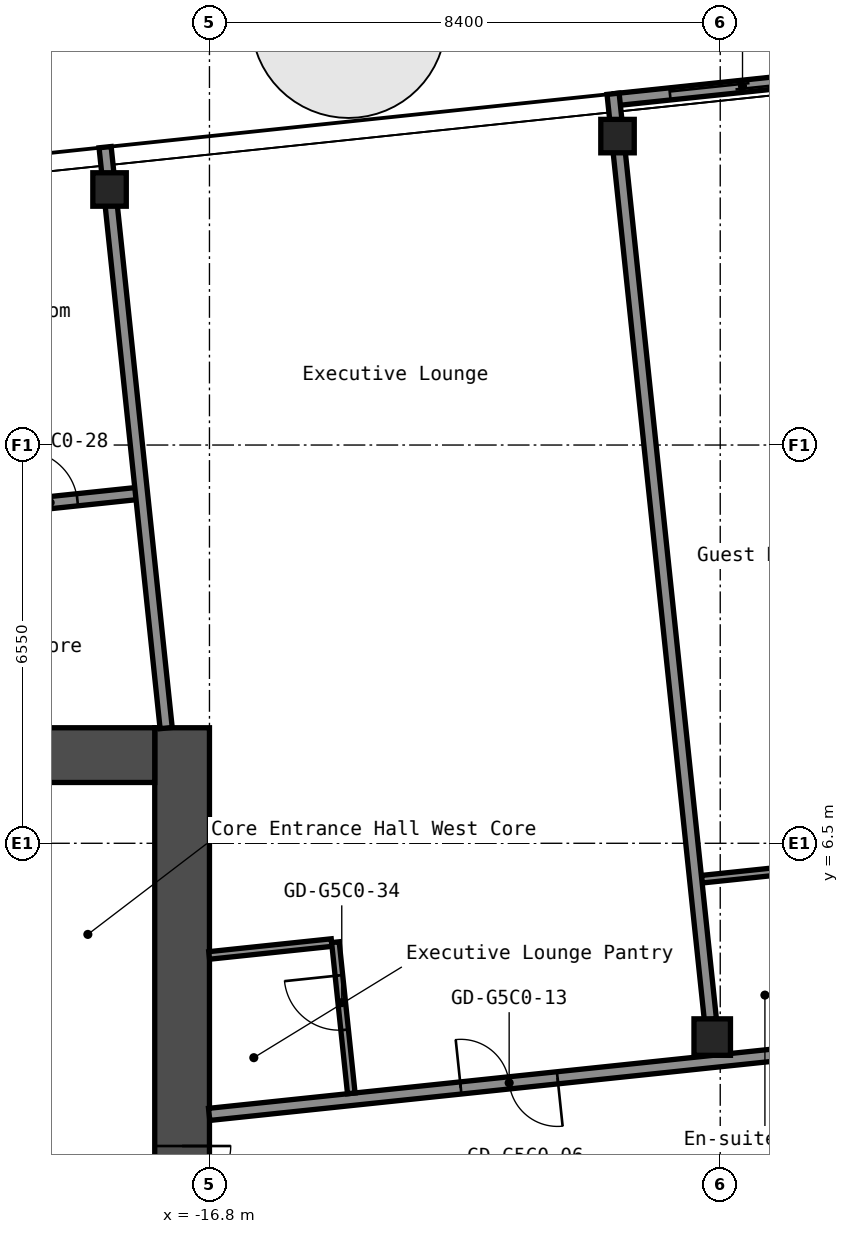
"""IFC4 building model, lengths in metres.
Left out: names, types, materials, properties, quantities, classifications, styles, units other than length and angle.
Written with IfcOpenShell. Run it as: python <this file> out.ifc"""

import sys

from ifc_helpers import new_model, si_unit, direction, frame, frame_2d, origin, origin_2d, place, context, subcontext, project, spatial, rectangle, hollow_rectangle, extrude, element, fill, save


model = new_model("IFC4")
c1 = context("Model", 3, precision=1e-05, world=origin(), true_north=direction((0.0, 1.0)))
c2 = subcontext(c1, "Body", "Model", "MODEL_VIEW")
j1 = project(units=[si_unit("LENGTHUNIT", "METRE"), si_unit("PLANEANGLEUNIT", "RADIAN")], contexts=[c1])
p1 = place(None, origin())
s1 = spatial("IfcSite", under=j1, at=p1, CompositionType="ELEMENT")
p2 = place(p1, origin())
s2 = spatial("IfcBuilding", under=s1, at=p2, CompositionType="ELEMENT")
p3 = place(p2, frame((0.0, 0.0, 245.4)))
s3 = spatial("IfcBuildingStorey", under=s2, at=p3, CompositionType="ELEMENT", Elevation=245.4)
p4 = place(p3, frame((-18.443, 17.253, 0.0), z_axis=(0.0, 0.0, 1.0), x_axis=(1.0, 0.0, 0.0)))
e1 = element("IfcColumn", 1, at=p4, inside=s3, PredefinedType="COLUMN", context=c2, shape_type="SweptSolid", body=[
    extrude(hollow_rectangle(XDim=0.55, YDim=0.55, WallThickness=0.022, InnerFilletRadius=0.033, OuterFilletRadius=0.055, at=origin_2d()), origin(), (0.0, 0.0, 1.0), 2.75),
])
p5 = place(p3, frame((-8.532, 3.312, 0.0), z_axis=(0.0, 0.0, 1.0), x_axis=(1.0, 0.0, 0.0)))
e2 = element("IfcColumn", 2, at=p5, inside=s3, PredefinedType="COLUMN", context=c2, shape_type="SweptSolid", body=[
    extrude(hollow_rectangle(XDim=0.6, YDim=0.6, WallThickness=0.025, InnerFilletRadius=0.038, OuterFilletRadius=0.062, at=origin_2d()), origin(), (0.0, 0.0, 1.0), 2.75),
])
p6 = place(p3, frame((-10.089, 18.131, 0.0), z_axis=(0.0, 0.0, 1.0), x_axis=(1.0, 0.0, 0.0)))
e3 = element("IfcColumn", 3, at=p6, inside=s3, PredefinedType="COLUMN", context=c2, shape_type="SweptSolid", body=[
    extrude(hollow_rectangle(XDim=0.55, YDim=0.55, WallThickness=0.022, InnerFilletRadius=0.033, OuterFilletRadius=0.055, at=origin_2d()), origin(), (0.0, 0.0, 1.0), 2.75),
])
p7 = place(p3, frame((-17.25, -8.4, 0.0), z_axis=(0.0, 0.0, 1.0), x_axis=(0.0, 1.0, 0.0)))
e4 = element("IfcWall", 4, at=p7, inside=s3, PredefinedType="SHEAR", context=c2, shape_type="SweptSolid", body=[
    extrude(rectangle(XDim=16.8, YDim=0.9, at=frame_2d((8.4, 0.0))), origin(), (0.0, 0.0, 1.0), 2.75),
])
p8 = place(p7, frame((8.321, 0.0, 0.0)))
e5 = element("IfcOpeningElement", 5, at=p8, cuts=e4, PredefinedType="OPENING", context=c2, shape_type="SweptSolid", body=[
    extrude(rectangle(XDim=1.6, YDim=2.1, at=frame_2d((0.8, 1.05))), frame((0.0, 0.46, 0.0), z_axis=(0.0, -1.0, 0.0), x_axis=(1.0, 0.0, 0.0)), (0.0, 0.0, 1.0), 0.92),
])
p9 = place(p3, frame((-32.7, 7.95, 0.0), z_axis=(0.0, 0.0, 1.0), x_axis=(1.0, 0.0, 0.0)))
e6 = element("IfcWall", 6, at=p9, inside=s3, PredefinedType="SHEAR", context=c2, shape_type="SweptSolid", body=[
    extrude(rectangle(XDim=15.0, YDim=0.9, at=frame_2d((7.5, 0.0))), origin(), (0.0, 0.0, 1.0), 2.75),
])
p10 = place(p9, frame((3.4, 0.0, 0.0)))
e7 = element("IfcOpeningElement", 7, at=p10, cuts=e6, PredefinedType="OPENING", context=c2, shape_type="SweptSolid", body=[
    extrude(rectangle(XDim=1.2, YDim=2.1, at=frame_2d((0.6, 1.05))), frame((0.0, 0.46, 0.0), z_axis=(0.0, -1.0, 0.0), x_axis=(1.0, 0.0, 0.0)), (0.0, 0.0, 1.0), 0.92),
])
p11 = place(p9, frame((0.75, 0.0, 0.0)))
e8 = element("IfcOpeningElement", 8, at=p11, cuts=e6, PredefinedType="OPENING", context=c2, shape_type="SweptSolid", body=[
    extrude(rectangle(XDim=0.9, YDim=2.1, at=frame_2d((0.45, 1.05))), frame((0.0, 0.46, 0.0), z_axis=(0.0, -1.0, 0.0), x_axis=(1.0, 0.0, 0.0)), (0.0, 0.0, 1.0), 0.92),
])
p12 = place(p3, frame((-16.572, -0.549, 0.0), z_axis=(0.0, 0.0, 1.0), x_axis=(0.994521146831, 0.104535584879, 0.0)))
e9 = element("IfcWall", 9, at=p12, inside=s3, PredefinedType="PARTITIONING", context=c2, shape_type="SweptSolid", body=[
    extrude(rectangle(XDim=33.561, YDim=0.2, at=frame_2d((16.78, 0.0))), origin(), (0.0, 0.0, 1.0), 2.75),
])
p13 = place(p12, frame((4.2, 0.0, 0.0)))
e10 = element("IfcOpeningElement", 10, at=p13, cuts=e9, PredefinedType="OPENING", context=c2, shape_type="SweptSolid", body=[
    extrude(rectangle(XDim=1.6, YDim=2.1, at=frame_2d((0.8, 1.05))), frame((0.0, 0.11, 0.0), z_axis=(0.0, -1.0, 0.0), x_axis=(1.0, 0.0, 0.0)), (0.0, 0.0, 1.0), 0.22),
])
p14 = place(p12, frame((11.25, 0.0, 0.0)))
e11 = element("IfcOpeningElement", 11, at=p14, cuts=e9, PredefinedType="OPENING", context=c2, shape_type="SweptSolid", body=[
    extrude(rectangle(XDim=1.0, YDim=2.1, at=frame_2d((0.5, 1.05))), frame((0.0, 0.11, 0.0), z_axis=(0.0, -1.0, 0.0), x_axis=(1.0, 0.0, 0.0)), (0.0, 0.0, 1.0), 0.22),
])
p15 = place(p12, frame((12.95, 0.0, 0.0)))
e12 = element("IfcOpeningElement", 12, at=p15, cuts=e9, PredefinedType="OPENING", context=c2, shape_type="SweptSolid", body=[
    extrude(rectangle(XDim=1.0, YDim=2.1, at=frame_2d((0.5, 1.05))), frame((0.0, 0.11, 0.0), z_axis=(0.0, -1.0, 0.0), x_axis=(1.0, 0.0, 0.0)), (0.0, 0.0, 1.0), 0.22),
])
p16 = place(p12, frame((18.2, 0.0, 0.0)))
e13 = element("IfcOpeningElement", 13, at=p16, cuts=e9, PredefinedType="OPENING", context=c2, shape_type="SweptSolid", body=[
    extrude(rectangle(XDim=0.9, YDim=2.1, at=frame_2d((0.45, 1.05))), frame((0.0, 0.11, 0.0), z_axis=(0.0, -1.0, 0.0), x_axis=(1.0, 0.0, 0.0)), (0.0, 0.0, 1.0), 0.22),
])
p17 = place(p12, frame((22.4, 0.0, 0.0)))
e14 = element("IfcOpeningElement", 14, at=p17, cuts=e9, PredefinedType="OPENING", context=c2, shape_type="SweptSolid", body=[
    extrude(rectangle(XDim=0.9, YDim=2.1, at=frame_2d((0.45, 1.05))), frame((0.0, 0.11, 0.0), z_axis=(0.0, -1.0, 0.0), x_axis=(1.0, 0.0, 0.0)), (0.0, 0.0, 1.0), 0.22),
])
p18 = place(p12, frame((26.345, 0.0, 0.0)))
e15 = element("IfcOpeningElement", 15, at=p18, cuts=e9, PredefinedType="OPENING", context=c2, shape_type="SweptSolid", body=[
    extrude(rectangle(XDim=0.9, YDim=2.1, at=frame_2d((0.45, 1.05))), frame((0.0, 0.11, 0.0), z_axis=(0.0, -1.0, 0.0), x_axis=(1.0, 0.0, 0.0)), (0.0, 0.0, 1.0), 0.22),
])
p19 = place(p12, frame((30.545, 0.0, 0.0)))
e16 = element("IfcOpeningElement", 16, at=p19, cuts=e9, PredefinedType="OPENING", context=c2, shape_type="SweptSolid", body=[
    extrude(rectangle(XDim=0.9, YDim=2.1, at=frame_2d((0.45, 1.05))), frame((0.0, 0.11, 0.0), z_axis=(0.0, -1.0, 0.0), x_axis=(1.0, 0.0, 0.0)), (0.0, 0.0, 1.0), 0.22),
])
p20 = place(p3, frame((-16.805, 2.041, 0.0), z_axis=(0.0, 0.0, 1.0), x_axis=(0.994521146831, 0.104535584879, 0.0)))
e17 = element("IfcWall", 17, at=p20, inside=s3, PredefinedType="PARTITIONING", context=c2, shape_type="SweptSolid", body=[
    extrude(rectangle(XDim=33.561, YDim=0.2, at=frame_2d((16.78, 0.0))), origin(), (0.0, 0.0, 1.0), 2.75),
])
p21 = place(p20, frame((4.161, 0.0, 0.0)))
e18 = element("IfcOpeningElement", 18, at=p21, cuts=e17, PredefinedType="OPENING", context=c2, shape_type="SweptSolid", body=[
    extrude(rectangle(XDim=1.6, YDim=2.1, at=frame_2d((0.8, 1.05))), frame((0.0, 0.11, 0.0), z_axis=(0.0, -1.0, 0.0), x_axis=(1.0, 0.0, 0.0)), (0.0, 0.0, 1.0), 0.22),
])
p22 = place(p20, frame((11.211, 0.0, 0.0)))
e19 = element("IfcOpeningElement", 19, at=p22, cuts=e17, PredefinedType="OPENING", context=c2, shape_type="SweptSolid", body=[
    extrude(rectangle(XDim=1.0, YDim=2.1, at=frame_2d((0.5, 1.05))), frame((0.0, 0.11, 0.0), z_axis=(0.0, -1.0, 0.0), x_axis=(1.0, 0.0, 0.0)), (0.0, 0.0, 1.0), 0.22),
])
p23 = place(p20, frame((12.911, 0.0, 0.0)))
e20 = element("IfcOpeningElement", 20, at=p23, cuts=e17, PredefinedType="OPENING", context=c2, shape_type="SweptSolid", body=[
    extrude(rectangle(XDim=1.0, YDim=2.1, at=frame_2d((0.5, 1.05))), frame((0.0, 0.11, 0.0), z_axis=(0.0, -1.0, 0.0), x_axis=(1.0, 0.0, 0.0)), (0.0, 0.0, 1.0), 0.22),
])
p24 = place(p20, frame((18.241, 0.0, 0.0)))
e21 = element("IfcOpeningElement", 21, at=p24, cuts=e17, PredefinedType="OPENING", context=c2, shape_type="SweptSolid", body=[
    extrude(rectangle(XDim=0.9, YDim=2.1, at=frame_2d((0.45, 1.05))), frame((0.0, 0.11, 0.0), z_axis=(0.0, -1.0, 0.0), x_axis=(1.0, 0.0, 0.0)), (0.0, 0.0, 1.0), 0.22),
])
p25 = place(p20, frame((22.441, 0.0, 0.0)))
e22 = element("IfcOpeningElement", 22, at=p25, cuts=e17, PredefinedType="OPENING", context=c2, shape_type="SweptSolid", body=[
    extrude(rectangle(XDim=0.9, YDim=2.1, at=frame_2d((0.45, 1.05))), frame((0.0, 0.11, 0.0), z_axis=(0.0, -1.0, 0.0), x_axis=(1.0, 0.0, 0.0)), (0.0, 0.0, 1.0), 0.22),
])
p26 = place(p20, frame((29.361, 0.0, 0.0)))
e23 = element("IfcOpeningElement", 23, at=p26, cuts=e17, PredefinedType="OPENING", context=c2, shape_type="SweptSolid", body=[
    extrude(rectangle(XDim=1.6, YDim=2.1, at=frame_2d((0.8, 1.05))), frame((0.0, 0.11, 0.0), z_axis=(0.0, -1.0, 0.0), x_axis=(1.0, 0.0, 0.0)), (0.0, 0.0, 1.0), 0.22),
])
p27 = place(p3, frame((-16.805, 4.655, 0.0), z_axis=(0.0, 0.0, 1.0), x_axis=(0.994521955988, 0.104527886512, 0.0)))
e24 = element("IfcWall", 24, at=p27, inside=s3, PredefinedType="PARTITIONING", context=c2, shape_type="SweptSolid", body=[
    extrude(rectangle(XDim=2.025, YDim=0.125, at=frame_2d((1.012, 0.0))), origin(), (0.0, 0.0, 1.0), 2.75),
])
p28 = place(p3, frame((-8.704, 5.909, 0.0), z_axis=(0.0, 0.0, 1.0), x_axis=(0.994530605544, 0.104445558238, 0.0)))
e25 = element("IfcWall", 25, at=p28, inside=s3, PredefinedType="PARTITIONING", context=c2, shape_type="SweptSolid", body=[
    extrude(rectangle(XDim=2.337, YDim=0.125, at=frame_2d((1.169, 0.0))), origin(), (0.0, 0.0, 1.0), 2.75),
])
p29 = place(p3, frame((-39.102, 10.034, 0.0), z_axis=(0.0, 0.0, 1.0), x_axis=(0.994522585465, 0.104521897229, 0.0)))
e26 = element("IfcWall", 26, at=p29, inside=s3, PredefinedType="PARTITIONING", context=c2, shape_type="SweptSolid", body=[
    extrude(rectangle(XDim=21.3, YDim=0.2, at=frame_2d((10.65, 0.0))), origin(), (0.0, 0.0, 1.0), 2.75),
])
p30 = place(p29, frame((3.05, 0.0, 0.0)))
e27 = element("IfcOpeningElement", 27, at=p30, cuts=e26, PredefinedType="OPENING", context=c2, shape_type="SweptSolid", body=[
    extrude(rectangle(XDim=1.0, YDim=2.1, at=frame_2d((0.5, 1.05))), frame((0.0, 0.11, 0.0), z_axis=(0.0, -1.0, 0.0), x_axis=(1.0, 0.0, 0.0)), (0.0, 0.0, 1.0), 0.22),
])
p31 = place(p29, frame((7.2, 0.0, 0.0)))
e28 = element("IfcOpeningElement", 28, at=p31, cuts=e26, PredefinedType="OPENING", context=c2, shape_type="SweptSolid", body=[
    extrude(rectangle(XDim=1.0, YDim=2.1, at=frame_2d((0.5, 1.05))), frame((0.0, 0.11, 0.0), z_axis=(0.0, -1.0, 0.0), x_axis=(1.0, 0.0, 0.0)), (0.0, 0.0, 1.0), 0.22),
])
p32 = place(p29, frame((9.2, 0.0, 0.0)))
e29 = element("IfcOpeningElement", 29, at=p32, cuts=e26, PredefinedType="OPENING", context=c2, shape_type="SweptSolid", body=[
    extrude(rectangle(XDim=1.0, YDim=2.1, at=frame_2d((0.5, 1.05))), frame((0.0, 0.11, 0.0), z_axis=(0.0, -1.0, 0.0), x_axis=(1.0, 0.0, 0.0)), (0.0, 0.0, 1.0), 0.22),
])
p33 = place(p29, frame((15.14, 0.0, 0.0)))
e30 = element("IfcOpeningElement", 30, at=p33, cuts=e26, PredefinedType="OPENING", context=c2, shape_type="SweptSolid", body=[
    extrude(rectangle(XDim=0.9, YDim=2.1, at=frame_2d((0.45, 1.05))), frame((0.0, 0.11, 0.0), z_axis=(0.0, -1.0, 0.0), x_axis=(1.0, 0.0, 0.0)), (0.0, 0.0, 1.0), 0.22),
])
p34 = place(p29, frame((19.34, 0.0, 0.0)))
e31 = element("IfcOpeningElement", 31, at=p34, cuts=e26, PredefinedType="OPENING", context=c2, shape_type="SweptSolid", body=[
    extrude(rectangle(XDim=0.9, YDim=2.1, at=frame_2d((0.45, 1.05))), frame((0.0, 0.11, 0.0), z_axis=(0.0, -1.0, 0.0), x_axis=(1.0, 0.0, 0.0)), (0.0, 0.0, 1.0), 0.22),
])
p35 = place(p3, frame((-17.512, 8.395, 0.0), z_axis=(0.0, 0.0, 1.0), x_axis=(-0.104524714473, 0.994522289375, 0.0)))
e32 = element("IfcWall", 32, at=p35, inside=s3, PredefinedType="PARTITIONING", context=c2, shape_type="SweptSolid", body=[
    extrude(rectangle(XDim=9.607, YDim=0.2, at=frame_2d((4.803, 0.0))), origin(), (0.0, 0.0, 1.0), 2.75),
])
p36 = place(p3, frame((-14.468, 2.387, 0.0), z_axis=(0.0, 0.0, 1.0), x_axis=(-0.104491611519, 0.994525767953, 0.0)))
e33 = element("IfcWall", 33, at=p36, inside=s3, PredefinedType="PARTITIONING", context=c2, shape_type="SweptSolid", body=[
    extrude(rectangle(XDim=2.5, YDim=0.125, at=frame_2d((1.25, 0.0))), origin(), (0.0, 0.0, 1.0), 2.75),
])
p37 = place(p36, frame((1.05, 0.0, 0.0)))
e34 = element("IfcOpeningElement", 34, at=p37, cuts=e33, PredefinedType="OPENING", context=c2, shape_type="SweptSolid", body=[
    extrude(rectangle(XDim=0.9, YDim=2.1, at=frame_2d((0.45, 1.05))), frame((0.0, 0.073, 0.0), z_axis=(0.0, -1.0, 0.0), x_axis=(1.0, 0.0, 0.0)), (0.0, 0.0, 1.0), 0.145),
])
p38 = place(p3, frame((-8.562, 3.603, 0.0), z_axis=(0.0, 0.0, 1.0), x_axis=(-0.104523729364, 0.99452239291, 0.0)))
e35 = element("IfcWall", 35, at=p38, inside=s3, PredefinedType="PARTITIONING", context=c2, shape_type="SweptSolid", body=[
    extrude(rectangle(XDim=15.308, YDim=0.2, at=frame_2d((7.654, 0.0))), origin(), (0.0, 0.0, 1.0), 2.75),
])
p39 = place(p3, frame((-5.935, 19.171, 0.0), z_axis=(0.0, 0.0, 1.0), x_axis=(-0.994520974641, -0.104537223034, 0.0)))
p40 = place(p39, frame((0.91, 0.0, 0.0)))
p41 = place(p40, frame((2.4, 0.0, 0.0), z_axis=(0.0, 0.0, 1.0), x_axis=(-1.0, 0.0, 0.0)))
e36 = element("IfcDoor", 36, at=p41, inside=s3, OperationType="SLIDING_TO_LEFT", PredefinedType="DOOR", context=c2, shape_type="SweptSolid", body=[
    extrude(rectangle(XDim=2.4, YDim=2.2, at=frame_2d((1.2, 1.1))), frame((0.0, 0.025, 0.0), z_axis=(0.0, -1.0, 0.0), x_axis=(1.0, 0.0, 0.0)), (0.0, 0.0, 1.0), 0.05),
])
p42 = place(p8, origin())
e37 = element("IfcDoor", 37, at=p42, inside=s3, OperationType="DOUBLE_DOOR_SINGLE_SWING", PredefinedType="DOOR", context=c2, shape_type="SweptSolid", body=[
    extrude(rectangle(XDim=1.6, YDim=2.1, at=frame_2d((0.8, 1.05))), frame((0.0, 0.025, 0.0), z_axis=(0.0, -1.0, 0.0), x_axis=(1.0, 0.0, 0.0)), (0.0, 0.0, 1.0), 0.05),
])
fill(e5, e37)
p43 = place(p21, origin())
e38 = element("IfcDoor", 38, at=p43, inside=s3, OperationType="DOUBLE_DOOR_SINGLE_SWING", PredefinedType="DOOR", context=c2, shape_type="SweptSolid", body=[
    extrude(rectangle(XDim=1.6, YDim=2.1, at=frame_2d((0.8, 1.05))), frame((0.0, 0.025, 0.0), z_axis=(0.0, -1.0, 0.0), x_axis=(1.0, 0.0, 0.0)), (0.0, 0.0, 1.0), 0.05),
])
fill(e18, e38)
p44 = place(p34, origin())
e39 = element("IfcDoor", 39, at=p44, inside=s3, OperationType="SINGLE_SWING_RIGHT", PredefinedType="DOOR", context=c2, shape_type="SweptSolid", body=[
    extrude(rectangle(XDim=0.9, YDim=2.1, at=frame_2d((0.45, 1.05))), frame((0.0, 0.025, 0.0), z_axis=(0.0, -1.0, 0.0), x_axis=(1.0, 0.0, 0.0)), (0.0, 0.0, 1.0), 0.05),
])
fill(e31, e39)
p45 = place(p37, origin())
e40 = element("IfcDoor", 40, at=p45, inside=s3, OperationType="SINGLE_SWING_LEFT", PredefinedType="DOOR", context=c2, shape_type="SweptSolid", body=[
    extrude(rectangle(XDim=0.9, YDim=2.1, at=frame_2d((0.45, 1.05))), frame((0.0, 0.025, 0.0), z_axis=(0.0, -1.0, 0.0), x_axis=(1.0, 0.0, 0.0)), (0.0, 0.0, 1.0), 0.05),
])
fill(e34, e40)
save(model, sys.argv[1])
